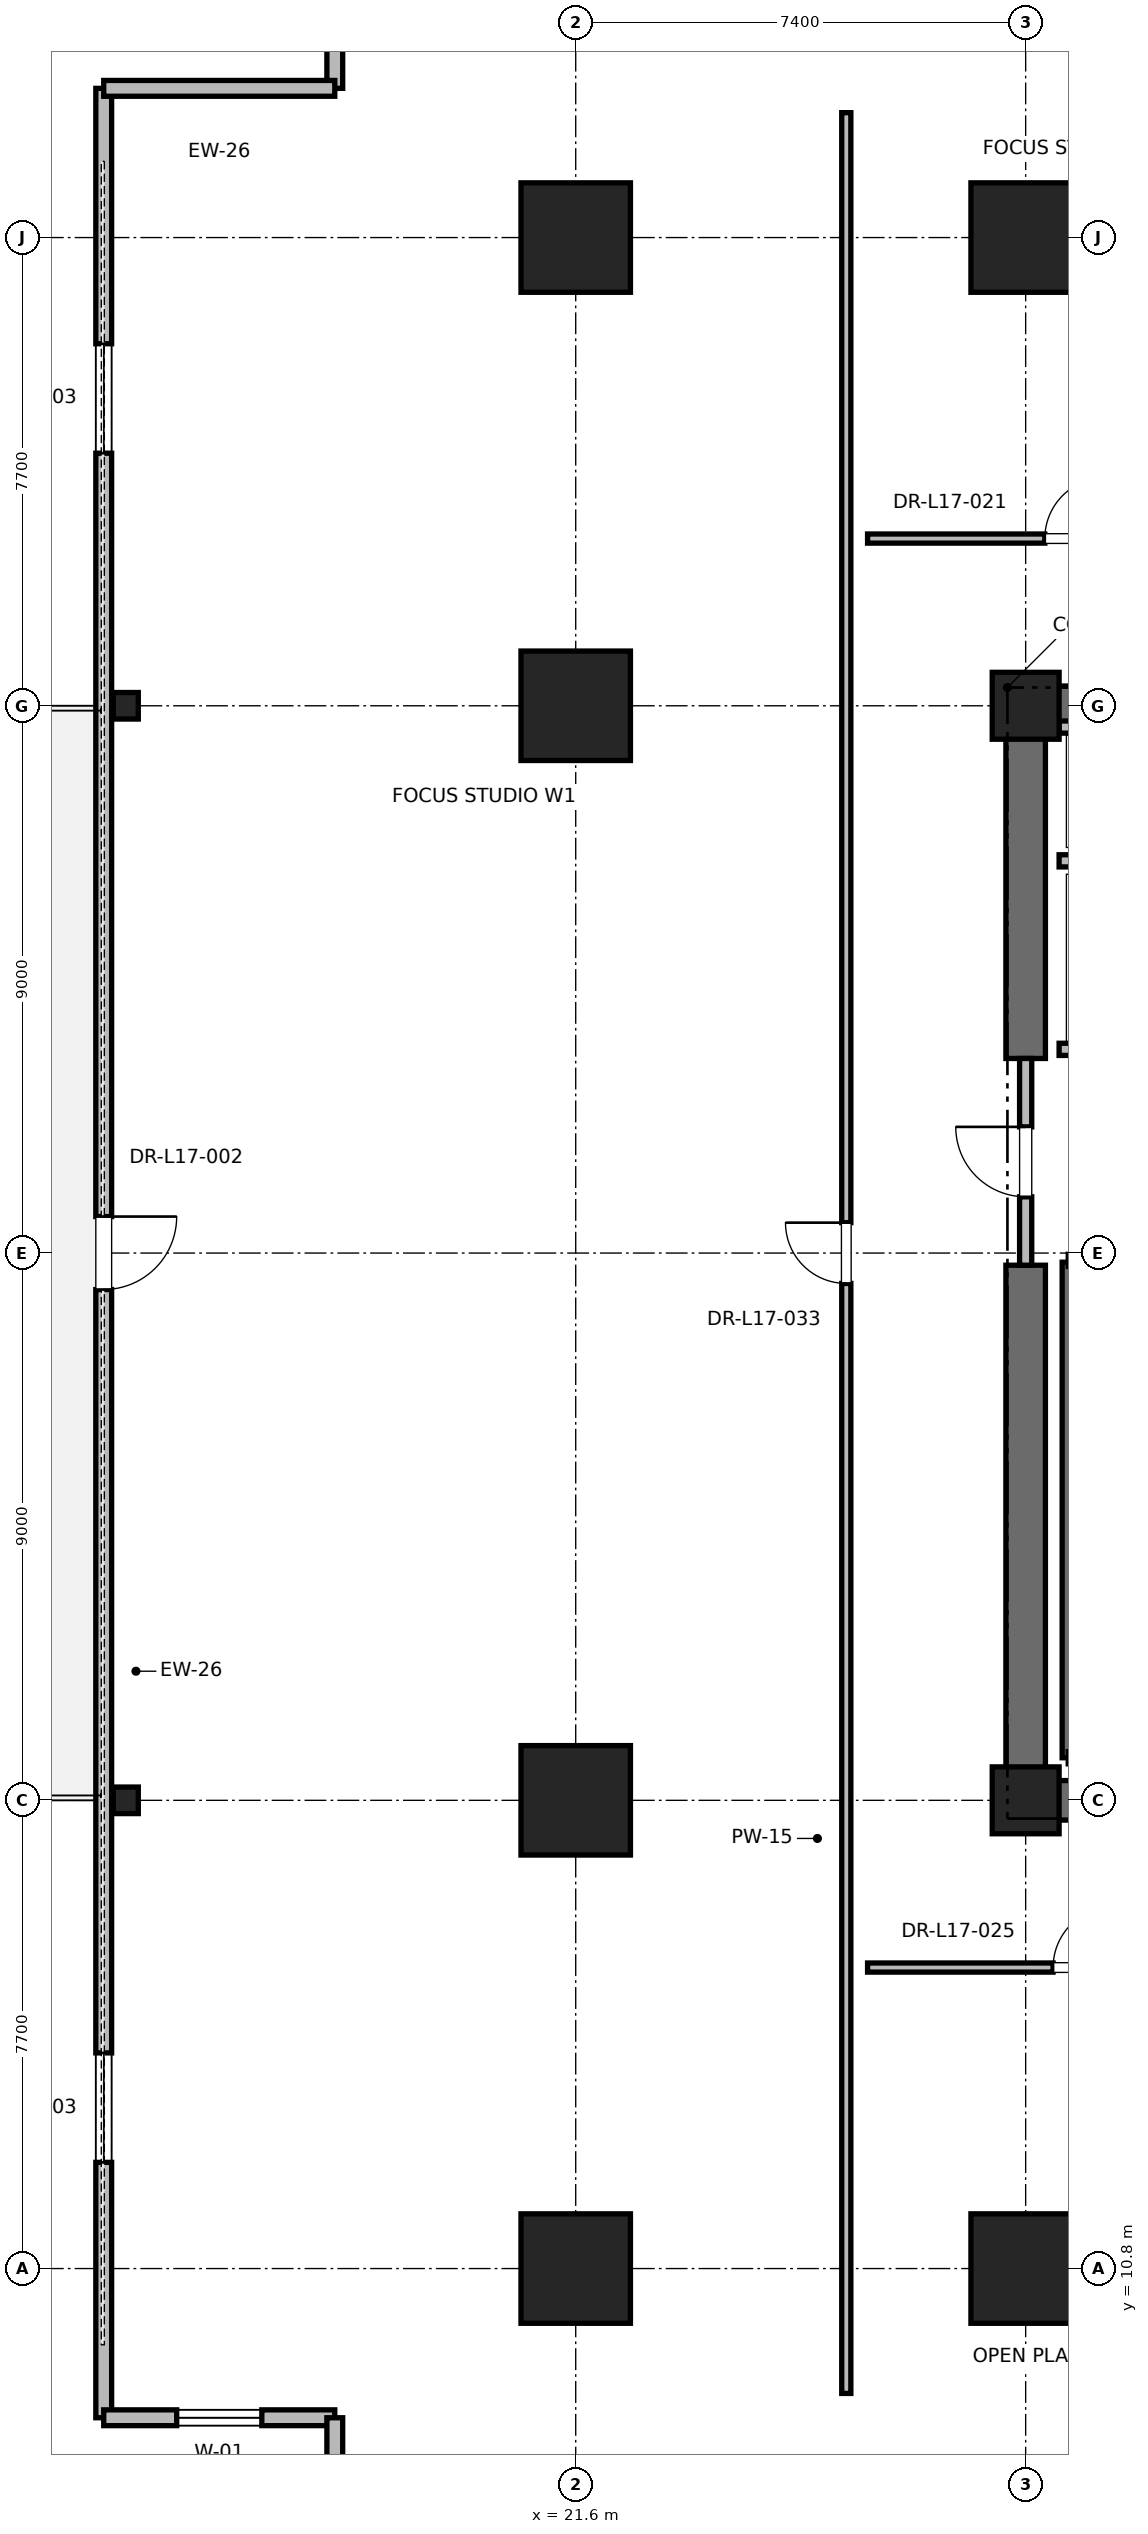
"""IFC4 building model, lengths in metres.
Left out: names, types, materials, properties, quantities, classifications, styles, units other than length and angle.
Written with IfcOpenShell. Run it as: python <this file> out.ifc"""

import sys

from ifc_helpers import new_model, si_unit, direction, frame, frame_2d, origin, origin_2d, place, context, subcontext, project, spatial, rectangle, i_section, extrude, element, fill, save


model = new_model("IFC4")
c1 = context("Model", 3, precision=1e-05, world=origin(), true_north=direction((0.0, 1.0)))
c2 = subcontext(c1, "Body", "Model", "MODEL_VIEW")
j1 = project(units=[si_unit("LENGTHUNIT", "METRE"), si_unit("PLANEANGLEUNIT", "RADIAN")], contexts=[c1])
p1 = place(None, origin())
s1 = spatial("IfcSite", under=j1, at=p1, CompositionType="ELEMENT")
p2 = place(p1, origin())
s2 = spatial("IfcBuilding", under=s1, at=p2, CompositionType="ELEMENT")
p3 = place(p2, frame((0.0, 0.0, 75.6)))
s3 = spatial("IfcBuildingStorey", under=s2, at=p3, CompositionType="ELEMENT", Elevation=75.6)
for number, where, z_axis, x_axis in (
    (1, (29.0, 10.8, 0.0), (0.0, 0.0, 1.0), (1.0, 0.0, 0.0)),
    (2, (29.0, 44.2, 0.0), (0.0, 0.0, 1.0), (1.0, 0.0, 0.0)),
    (3, (21.6, 18.5, 0.0), (0.0, 0.0, 1.0), (1.0, 0.0, 0.0)),
    (4, (21.6, 36.5, 0.0), (0.0, 0.0, 1.0), (1.0, 0.0, 0.0)),
    (5, (21.6, 10.8, 0.0), (0.0, 0.0, 1.0), (1.0, 0.0, 0.0)),
    (6, (21.6, 44.2, 0.0), (0.0, 0.0, 1.0), (1.0, 0.0, 0.0)),
):
    element("IfcColumn", number, at=place(p3, frame(where, z_axis=z_axis, x_axis=x_axis)), inside=s3, PredefinedType="COLUMN", context=c2, shape_type="SweptSolid", body=[
        extrude(rectangle(XDim=1.8, YDim=1.8, at=origin_2d()), origin(), (0.0, 0.0, 1.0), 4.0),
    ])
for number, where, z_axis, x_axis in (
    (7, (14.2, 18.5, 0.0), (0.0, 0.0, 1.0), (1.0, 0.0, 0.0)),
    (8, (14.2, 36.5, 0.0), (0.0, 0.0, 1.0), (1.0, 0.0, 0.0)),
):
    element("IfcColumn", number, at=place(p3, frame(where, z_axis=z_axis, x_axis=x_axis)), inside=s3, PredefinedType="COLUMN", context=c2, shape_type="SweptSolid", body=[
        extrude(i_section(OverallWidth=0.412, OverallDepth=0.437, WebThickness=0.036, FlangeThickness=0.058, FilletRadius=0.015, at=origin_2d()), origin(), (0.0, 0.0, 1.0), 4.0),
    ])
for number, where, z_axis, x_axis in (
    (9, (29.0, 18.5, 0.0), (0.0, 0.0, 1.0), (1.0, 0.0, 0.0)),
    (10, (29.0, 36.5, 0.0), (0.0, 0.0, 1.0), (1.0, 0.0, 0.0)),
):
    element("IfcColumn", number, at=place(p3, frame(where, z_axis=z_axis, x_axis=x_axis)), inside=s3, PredefinedType="PILASTER", context=c2, shape_type="SweptSolid", body=[
        extrude(rectangle(XDim=1.1, YDim=1.1, at=origin_2d()), origin(), (0.0, 0.0, 1.0), 4.0),
    ])
p4 = place(p3, frame((29.0, 18.5, 0.0), z_axis=(0.0, 0.0, 1.0), x_axis=(1.0, 0.0, 0.0)))
e11 = element("IfcWall", 11, at=p4, inside=s3, PredefinedType="SHEAR", context=c2, shape_type="SweptSolid", body=[
    extrude(rectangle(XDim=9.2, YDim=0.65, at=frame_2d((4.6, 0.0))), origin(), (0.0, 0.0, 1.0), 3.76),
])
p5 = place(p3, frame((29.0, 36.5, 0.0), z_axis=(0.0, 0.0, 1.0), x_axis=(1.0, 0.0, 0.0)))
e12 = element("IfcWall", 12, at=p5, inside=s3, PredefinedType="SHEAR", context=c2, shape_type="SweptSolid", body=[
    extrude(rectangle(XDim=5.8, YDim=0.65, at=frame_2d((2.9, 0.0))), origin(), (0.0, 0.0, 1.0), 3.76),
])
p6 = place(p3, frame((29.0, 18.5, 0.0), z_axis=(0.0, 0.0, 1.0), x_axis=(0.0, 1.0, 0.0)))
e13 = element("IfcWall", 13, at=p6, inside=s3, PredefinedType="SHEAR", context=c2, shape_type="SweptSolid", body=[
    extrude(rectangle(XDim=8.8, YDim=0.65, at=frame_2d((4.4, 0.0))), origin(), (0.0, 0.0, 1.0), 3.76),
])
p7 = place(p3, frame((29.0, 30.7, 0.0), z_axis=(0.0, 0.0, 1.0), x_axis=(0.0, 1.0, 0.0)))
e14 = element("IfcWall", 14, at=p7, inside=s3, PredefinedType="SHEAR", context=c2, shape_type="SweptSolid", body=[
    extrude(rectangle(XDim=5.8, YDim=0.65, at=frame_2d((2.9, 0.0))), origin(), (0.0, 0.0, 1.0), 3.76),
])
p8 = place(p3, frame((13.838, 46.654, 0.0), z_axis=(0.0, 0.0, 1.0), x_axis=(0.0, -1.0, 0.0)))
e15 = element("IfcWall", 15, at=p8, inside=s3, PredefinedType="PARAPET", context=c2, shape_type="SweptSolid", body=[
    extrude(rectangle(XDim=38.308, YDim=0.26, at=frame_2d((19.154, 0.0))), origin(), (0.0, 0.0, 1.0), 2.889),
])
p9 = place(p8, frame((4.2, 0.0, 0.85)))
e16 = element("IfcOpeningElement", 16, at=p9, cuts=e15, PredefinedType="OPENING", context=c2, shape_type="SweptSolid", body=[
    extrude(rectangle(XDim=1.8, YDim=2.2, at=frame_2d((0.9, 1.1))), frame((0.0, 0.13, 0.0), z_axis=(0.0, -1.0, 0.0), x_axis=(1.0, 0.0, 0.0)), (0.0, 0.0, 1.0), 0.26),
])
p10 = place(p8, frame((18.554, 0.0, 0.0)))
e17 = element("IfcOpeningElement", 17, at=p10, cuts=e15, PredefinedType="OPENING", context=c2, shape_type="SweptSolid", body=[
    extrude(rectangle(XDim=1.2, YDim=2.2, at=frame_2d((0.6, 1.1))), frame((0.0, 0.13, 0.0), z_axis=(0.0, -1.0, 0.0), x_axis=(1.0, 0.0, 0.0)), (0.0, 0.0, 1.0), 0.26),
])
p11 = place(p8, frame((32.307, 0.0, 0.85)))
e18 = element("IfcOpeningElement", 18, at=p11, cuts=e15, PredefinedType="OPENING", context=c2, shape_type="SweptSolid", body=[
    extrude(rectangle(XDim=1.8, YDim=2.2, at=frame_2d((0.9, 1.1))), frame((0.0, 0.13, 0.0), z_axis=(0.0, -1.0, 0.0), x_axis=(1.0, 0.0, 0.0)), (0.0, 0.0, 1.0), 0.26),
])
p12 = place(p3, frame((13.838, 8.346, 0.0), z_axis=(0.0, 0.0, 1.0), x_axis=(1.0, 0.0, 0.0)))
e19 = element("IfcWall", 19, at=p12, inside=s3, PredefinedType="PARAPET", context=c2, shape_type="SweptSolid", body=[
    extrude(rectangle(XDim=3.8, YDim=0.26, at=frame_2d((1.9, 0.0))), origin(), (0.0, 0.0, 1.0), 3.76),
])
p13 = place(p12, frame((1.2, 0.0, 0.85)))
e20 = element("IfcOpeningElement", 20, at=p13, cuts=e19, PredefinedType="OPENING", context=c2, shape_type="SweptSolid", body=[
    extrude(rectangle(XDim=1.4, YDim=2.0, at=frame_2d((0.7, 1.0))), frame((0.0, 0.13, 0.0), z_axis=(0.0, -1.0, 0.0), x_axis=(1.0, 0.0, 0.0)), (0.0, 0.0, 1.0), 0.26),
])
p14 = place(p3, frame((17.638, 8.346, 0.0), z_axis=(0.0, 0.0, 1.0), x_axis=(0.0, -1.0, 0.0)))
e21 = element("IfcWall", 21, at=p14, inside=s3, PredefinedType="PARAPET", context=c2, shape_type="SweptSolid", body=[
    extrude(rectangle(XDim=3.4, YDim=0.26, at=frame_2d((1.7, 0.0))), origin(), (0.0, 0.0, 1.0), 3.76),
])
p15 = place(p3, frame((17.638, 50.054, 0.0), z_axis=(0.0, 0.0, 1.0), x_axis=(0.0, -1.0, 0.0)))
e22 = element("IfcWall", 22, at=p15, inside=s3, PredefinedType="PARAPET", context=c2, shape_type="SweptSolid", body=[
    extrude(rectangle(XDim=3.4, YDim=0.26, at=frame_2d((1.7, 0.0))), origin(), (0.0, 0.0, 1.0), 3.76),
])
p16 = place(p15, frame((1.0, 0.0, 0.85)))
e23 = element("IfcOpeningElement", 23, at=p16, cuts=e22, PredefinedType="OPENING", context=c2, shape_type="SweptSolid", body=[
    extrude(rectangle(XDim=1.4, YDim=2.0, at=frame_2d((0.7, 1.0))), frame((0.0, 0.13, 0.0), z_axis=(0.0, -1.0, 0.0), x_axis=(1.0, 0.0, 0.0)), (0.0, 0.0, 1.0), 0.26),
])
p17 = place(p3, frame((17.638, 46.654, 0.0), z_axis=(0.0, 0.0, 1.0), x_axis=(-1.0, 0.0, 0.0)))
e24 = element("IfcWall", 24, at=p17, inside=s3, PredefinedType="PARAPET", context=c2, shape_type="SweptSolid", body=[
    extrude(rectangle(XDim=3.8, YDim=0.26, at=frame_2d((1.9, 0.0))), origin(), (0.0, 0.0, 1.0), 3.76),
])
p18 = place(p3, frame((29.7, 19.2, 0.0), z_axis=(0.0, 0.0, 1.0), x_axis=(0.0, 1.0, 0.0)))
e25 = element("IfcWall", 25, at=p18, inside=s3, PredefinedType="SOLIDWALL", context=c2, shape_type="SweptSolid", body=[
    extrude(rectangle(XDim=8.15, YDim=0.2, at=frame_2d((4.075, 0.0))), origin(), (0.0, 0.0, 1.0), 3.76),
])
p19 = place(p3, frame((29.0, 27.3, 0.0), z_axis=(0.0, 0.0, 1.0), x_axis=(0.0, 1.0, 0.0)))
e26 = element("IfcWall", 26, at=p19, inside=s3, PredefinedType="PARTITIONING", context=c2, shape_type="SweptSolid", body=[
    extrude(rectangle(XDim=3.4, YDim=0.2, at=frame_2d((1.7, 0.0))), origin(), (0.0, 0.0, 1.0), 2.54),
])
p20 = place(p19, frame((1.125, 0.0, 0.0)))
e27 = element("IfcOpeningElement", 27, at=p20, cuts=e26, PredefinedType="OPENING", context=c2, shape_type="SweptSolid", body=[
    extrude(rectangle(XDim=1.15, YDim=2.2, at=frame_2d((0.575, 1.1))), frame((0.0, 0.1, 0.0), z_axis=(0.0, -1.0, 0.0), x_axis=(1.0, 0.0, 0.0)), (0.0, 0.0, 1.0), 0.2),
])
p21 = place(p3, frame((29.55, 30.85, 0.0), z_axis=(0.0, 0.0, 1.0), x_axis=(1.0, 0.0, 0.0)))
e28 = element("IfcWall", 28, at=p21, inside=s3, PredefinedType="SOLIDWALL", context=c2, shape_type="SweptSolid", body=[
    extrude(rectangle(XDim=2.6, YDim=0.2, at=frame_2d((1.3, 0.0))), origin(), (0.0, 0.0, 1.0), 2.54),
])
p22 = place(p21, frame((0.75, 0.0, 0.0)))
e29 = element("IfcOpeningElement", 29, at=p22, cuts=e28, PredefinedType="OPENING", context=c2, shape_type="SweptSolid", body=[
    extrude(rectangle(XDim=1.1, YDim=2.2, at=frame_2d((0.55, 1.1))), frame((0.0, 0.1, 0.0), z_axis=(0.0, -1.0, 0.0), x_axis=(1.0, 0.0, 0.0)), (0.0, 0.0, 1.0), 0.2),
])
p23 = place(p3, frame((29.55, 33.95, 0.0), z_axis=(0.0, 0.0, 1.0), x_axis=(1.0, 0.0, 0.0)))
e30 = element("IfcWall", 30, at=p23, inside=s3, PredefinedType="SOLIDWALL", context=c2, shape_type="SweptSolid", body=[
    extrude(rectangle(XDim=2.8, YDim=0.2, at=frame_2d((1.4, 0.0))), origin(), (0.0, 0.0, 1.0), 3.76),
])
p24 = place(p3, frame((32.35, 36.15, 0.0), z_axis=(0.0, 0.0, 1.0), x_axis=(-1.0, 0.0, 0.0)))
e31 = element("IfcWall", 31, at=p24, inside=s3, PredefinedType="SOLIDWALL", context=c2, shape_type="SweptSolid", body=[
    extrude(rectangle(XDim=2.8, YDim=0.2, at=frame_2d((1.4, 0.0))), origin(), (0.0, 0.0, 1.0), 2.889),
])
p25 = place(p3, frame((26.4, 39.25, 0.0), z_axis=(0.0, 0.0, 1.0), x_axis=(1.0, 0.0, 0.0)))
e32 = element("IfcWall", 32, at=p25, inside=s3, PredefinedType="PARTITIONING", context=c2, shape_type="SweptSolid", body=[
    extrude(rectangle(XDim=6.8, YDim=0.15, at=frame_2d((3.4, 0.0))), origin(), (0.0, 0.0, 1.0), 2.85),
])
p26 = place(p25, frame((2.915, 0.0, 0.0)))
e33 = element("IfcOpeningElement", 33, at=p26, cuts=e32, PredefinedType="OPENING", context=c2, shape_type="SweptSolid", body=[
    extrude(rectangle(XDim=1.0, YDim=2.15, at=frame_2d((0.5, 1.075))), frame((0.0, 0.075, 0.0), z_axis=(0.0, -1.0, 0.0), x_axis=(1.0, 0.0, 0.0)), (0.0, 0.0, 1.0), 0.15),
])
p27 = place(p3, frame((26.4, 15.75, 0.0), z_axis=(0.0, 0.0, 1.0), x_axis=(1.0, 0.0, 0.0)))
e34 = element("IfcWall", 34, at=p27, inside=s3, PredefinedType="PARTITIONING", context=c2, shape_type="SweptSolid", body=[
    extrude(rectangle(XDim=7.072, YDim=0.15, at=frame_2d((3.536, 0.0))), origin(), (0.0, 0.0, 1.0), 2.85),
])
p28 = place(p27, frame((3.051, 0.0, 0.0)))
e35 = element("IfcOpeningElement", 35, at=p28, cuts=e34, PredefinedType="OPENING", context=c2, shape_type="SweptSolid", body=[
    extrude(rectangle(XDim=1.0, YDim=2.15, at=frame_2d((0.5, 1.075))), frame((0.0, 0.075, 0.0), z_axis=(0.0, -1.0, 0.0), x_axis=(1.0, 0.0, 0.0)), (0.0, 0.0, 1.0), 0.15),
])
p29 = place(p3, frame((26.05, 8.746, 0.0), z_axis=(0.0, 0.0, 1.0), x_axis=(0.0, 1.0, 0.0)))
e36 = element("IfcWall", 36, at=p29, inside=s3, PredefinedType="PARTITIONING", context=c2, shape_type="SweptSolid", body=[
    extrude(rectangle(XDim=37.507, YDim=0.15, at=frame_2d((18.754, 0.0))), origin(), (0.0, 0.0, 1.0), 2.85),
])
p30 = place(p29, frame((18.254, 0.0, 0.0)))
e37 = element("IfcOpeningElement", 37, at=p30, cuts=e36, PredefinedType="OPENING", context=c2, shape_type="SweptSolid", body=[
    extrude(rectangle(XDim=1.0, YDim=2.15, at=frame_2d((0.5, 1.075))), frame((0.0, 0.075, 0.0), z_axis=(0.0, -1.0, 0.0), x_axis=(1.0, 0.0, 0.0)), (0.0, 0.0, 1.0), 0.15),
])
p31 = place(p9, origin())
e38 = element("IfcWindow", 38, at=p31, inside=s3, PartitioningType="SINGLE_PANEL", PredefinedType="WINDOW", context=c2, shape_type="SweptSolid", body=[
    extrude(rectangle(XDim=1.8, YDim=2.2, at=frame_2d((0.9, 1.1))), frame((0.0, 0.03, 0.0), z_axis=(0.0, -1.0, 0.0), x_axis=(1.0, 0.0, 0.0)), (0.0, 0.0, 1.0), 0.06),
])
fill(e16, e38)
p32 = place(p10, origin())
e39 = element("IfcDoor", 39, at=p32, inside=s3, OperationType="SINGLE_SWING_LEFT", PredefinedType="DOOR", context=c2, shape_type="SweptSolid", body=[
    extrude(rectangle(XDim=1.2, YDim=2.2, at=frame_2d((0.6, 1.1))), frame((0.0, 0.025, 0.0), z_axis=(0.0, -1.0, 0.0), x_axis=(1.0, 0.0, 0.0)), (0.0, 0.0, 1.0), 0.05),
])
fill(e17, e39)
p33 = place(p11, origin())
e40 = element("IfcWindow", 40, at=p33, inside=s3, PartitioningType="SINGLE_PANEL", PredefinedType="WINDOW", context=c2, shape_type="SweptSolid", body=[
    extrude(rectangle(XDim=1.8, YDim=2.2, at=frame_2d((0.9, 1.1))), frame((0.0, 0.03, 0.0), z_axis=(0.0, -1.0, 0.0), x_axis=(1.0, 0.0, 0.0)), (0.0, 0.0, 1.0), 0.06),
])
fill(e18, e40)
p34 = place(p13, origin())
e41 = element("IfcWindow", 41, at=p34, inside=s3, PartitioningType="SINGLE_PANEL", PredefinedType="WINDOW", context=c2, shape_type="SweptSolid", body=[
    extrude(rectangle(XDim=1.4, YDim=2.0, at=frame_2d((0.7, 1.0))), frame((0.0, 0.03, 0.0), z_axis=(0.0, -1.0, 0.0), x_axis=(1.0, 0.0, 0.0)), (0.0, 0.0, 1.0), 0.06),
])
fill(e20, e41)
p35 = place(p20, origin())
e42 = element("IfcDoor", 42, at=p35, inside=s3, OperationType="SINGLE_SWING_RIGHT", PredefinedType="DOOR", context=c2, shape_type="SweptSolid", body=[
    extrude(rectangle(XDim=1.15, YDim=2.2, at=frame_2d((0.575, 1.1))), frame((0.0, 0.025, 0.0), z_axis=(0.0, -1.0, 0.0), x_axis=(1.0, 0.0, 0.0)), (0.0, 0.0, 1.0), 0.05),
])
fill(e27, e42)
p36 = place(p26, origin())
e43 = element("IfcDoor", 43, at=p36, inside=s3, OperationType="SINGLE_SWING_RIGHT", PredefinedType="DOOR", context=c2, shape_type="SweptSolid", body=[
    extrude(rectangle(XDim=1.0, YDim=2.15, at=frame_2d((0.5, 1.075))), frame((0.0, 0.025, 0.0), z_axis=(0.0, -1.0, 0.0), x_axis=(1.0, 0.0, 0.0)), (0.0, 0.0, 1.0), 0.05),
])
fill(e33, e43)
p37 = place(p28, origin())
e44 = element("IfcDoor", 44, at=p37, inside=s3, OperationType="SINGLE_SWING_RIGHT", PredefinedType="DOOR", context=c2, shape_type="SweptSolid", body=[
    extrude(rectangle(XDim=1.0, YDim=2.15, at=frame_2d((0.5, 1.075))), frame((0.0, 0.025, 0.0), z_axis=(0.0, -1.0, 0.0), x_axis=(1.0, 0.0, 0.0)), (0.0, 0.0, 1.0), 0.05),
])
fill(e35, e44)
p38 = place(p30, origin())
e45 = element("IfcDoor", 45, at=p38, inside=s3, OperationType="SINGLE_SWING_RIGHT", PredefinedType="DOOR", context=c2, shape_type="SweptSolid", body=[
    extrude(rectangle(XDim=1.0, YDim=2.15, at=frame_2d((0.5, 1.075))), frame((0.0, 0.025, 0.0), z_axis=(0.0, -1.0, 0.0), x_axis=(1.0, 0.0, 0.0)), (0.0, 0.0, 1.0), 0.05),
])
fill(e37, e45)
save(model, sys.argv[1])
